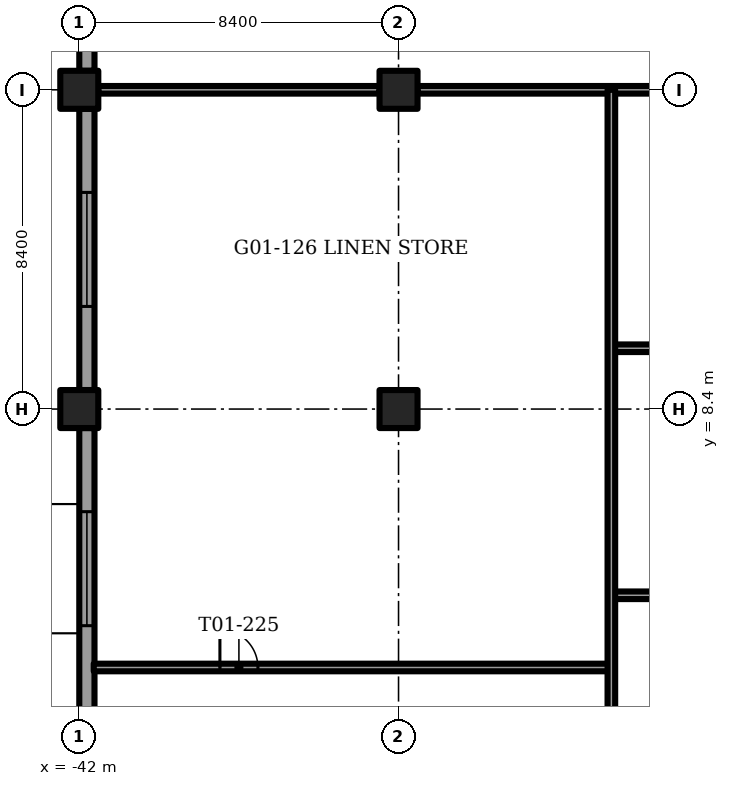
"""IFC4 building model, lengths in metres.
Left out: names, types, materials, properties, quantities, classifications, styles, units other than length and angle.
Written with IfcOpenShell. Run it as: python <this file> out.ifc"""

import sys

from ifc_helpers import new_model, si_unit, direction, frame, frame_2d, origin, origin_2d, place, context, subcontext, project, spatial, rectangle, extrude, element, fill, save


model = new_model("IFC4")
c1 = context("Model", 3, precision=1e-05, world=origin(), true_north=direction((0.0, 1.0)))
c2 = subcontext(c1, "Body", "Model", "MODEL_VIEW")
j1 = project(units=[si_unit("LENGTHUNIT", "METRE"), si_unit("PLANEANGLEUNIT", "RADIAN")], contexts=[c1])
p1 = place(None, origin())
s1 = spatial("IfcSite", under=j1, at=p1, CompositionType="ELEMENT")
p2 = place(p1, origin())
s2 = spatial("IfcBuilding", under=s1, at=p2, CompositionType="ELEMENT")
p3 = place(p2, frame((0.0, 0.0, 6.0)))
s3 = spatial("IfcBuildingStorey", under=s2, at=p3, CompositionType="ELEMENT", Elevation=6.0)
for number, where, z_axis, x_axis in (
    (1, (-42.0, 8.4, -0.35), (0.0, 0.0, 1.0), (1.0, 0.0, 0.0)),
    (2, (-42.0, 16.8, -0.35), (0.0, 0.0, 1.0), (1.0, 0.0, 0.0)),
    (3, (-33.6, 8.4, -0.35), (0.0, 0.0, 1.0), (1.0, 0.0, 0.0)),
    (4, (-33.6, 16.8, -0.35), (0.0, 0.0, 1.0), (1.0, 0.0, 0.0)),
):
    element("IfcColumn", number, at=place(p3, frame(where, z_axis=z_axis, x_axis=x_axis)), inside=s3, PredefinedType="COLUMN", context=c2, shape_type="SweptSolid", body=[
        extrude(rectangle(XDim=1.0, YDim=1.0, at=origin_2d()), origin(), (0.0, 0.0, 1.0), 4.0),
    ])
p4 = place(p3, frame((-41.8, 0.5, 0.0), z_axis=(0.0, 0.0, 1.0), x_axis=(0.0, 1.0, 0.0)))
e5 = element("IfcWall", 5, at=p4, inside=s3, PredefinedType="SOLIDWALL", context=c2, shape_type="SweptSolid", body=[
    extrude(rectangle(XDim=7.4, YDim=0.4, at=frame_2d((3.7, 0.0))), origin(), (0.0, 0.0, 1.0), 3.65),
])
p5 = place(p4, frame((2.2, 0.0, 1.0)))
e6 = element("IfcOpeningElement", 6, at=p5, cuts=e5, PredefinedType="OPENING", context=c2, shape_type="SweptSolid", body=[
    extrude(rectangle(XDim=3.0, YDim=2.2, at=frame_2d((1.5, 1.1))), frame((0.0, 0.2, 0.0), z_axis=(0.0, -1.0, 0.0), x_axis=(1.0, 0.0, 0.0)), (0.0, 0.0, 1.0), 0.4),
])
p6 = place(p3, frame((-41.8, 8.9, 0.0), z_axis=(0.0, 0.0, 1.0), x_axis=(0.0, 1.0, 0.0)))
e7 = element("IfcWall", 7, at=p6, inside=s3, PredefinedType="SOLIDWALL", context=c2, shape_type="SweptSolid", body=[
    extrude(rectangle(XDim=7.4, YDim=0.4, at=frame_2d((3.7, 0.0))), origin(), (0.0, 0.0, 1.0), 3.65),
])
p7 = place(p6, frame((2.2, 0.0, 1.0)))
e8 = element("IfcOpeningElement", 8, at=p7, cuts=e7, PredefinedType="OPENING", context=c2, shape_type="SweptSolid", body=[
    extrude(rectangle(XDim=3.0, YDim=2.2, at=frame_2d((1.5, 1.1))), frame((0.0, 0.2, 0.0), z_axis=(0.0, -1.0, 0.0), x_axis=(1.0, 0.0, 0.0)), (0.0, 0.0, 1.0), 0.4),
])
p8 = place(p3, frame((-41.8, 17.3, 0.0), z_axis=(0.0, 0.0, 1.0), x_axis=(0.0, 1.0, 0.0)))
e9 = element("IfcWall", 9, at=p8, inside=s3, PredefinedType="SOLIDWALL", context=c2, shape_type="SweptSolid", body=[
    extrude(rectangle(XDim=7.4, YDim=0.4, at=frame_2d((3.7, 0.0))), origin(), (0.0, 0.0, 1.0), 3.65),
])
p9 = place(p8, frame((2.2, 0.0, 1.0)))
e10 = element("IfcOpeningElement", 10, at=p9, cuts=e9, PredefinedType="OPENING", context=c2, shape_type="SweptSolid", body=[
    extrude(rectangle(XDim=3.0, YDim=2.2, at=frame_2d((1.5, 1.1))), frame((0.0, 0.2, 0.0), z_axis=(0.0, -1.0, 0.0), x_axis=(1.0, 0.0, 0.0)), (0.0, 0.0, 1.0), 0.4),
])
p10 = place(p3, frame((-41.62, 1.6, 0.0), z_axis=(0.0, 0.0, 1.0), x_axis=(1.0, 0.0, 0.0)))
e11 = element("IfcWall", 11, at=p10, inside=s3, PredefinedType="PARTITIONING", context=c2, shape_type="SweptSolid", body=[
    extrude(rectangle(XDim=13.62, YDim=0.2, at=frame_2d((6.81, 0.0))), origin(), (0.0, 0.0, 1.0), 3.65),
])
p11 = place(p10, frame((3.32, 0.0, 0.0)))
e12 = element("IfcOpeningElement", 12, at=p11, cuts=e11, PredefinedType="OPENING", context=c2, shape_type="SweptSolid", body=[
    extrude(rectangle(XDim=1.0, YDim=2.1, at=frame_2d((0.5, 1.05))), frame((0.0, 0.1, 0.0), z_axis=(0.0, -1.0, 0.0), x_axis=(1.0, 0.0, 0.0)), (0.0, 0.0, 1.0), 0.2),
])
for number, where, z_axis, x_axis in (
    (13, (-28.0, 3.5, 0.0), (0.0, 0.0, 1.0), (1.0, 0.0, 0.0)),
    (14, (-28.0, 10.0, 0.0), (0.0, 0.0, 1.0), (1.0, 0.0, 0.0)),
):
    element("IfcWall", number, at=place(p3, frame(where, z_axis=z_axis, x_axis=x_axis)), inside=s3, PredefinedType="PARTITIONING", context=c2, shape_type="SweptSolid", body=[
        extrude(rectangle(XDim=14.0, YDim=0.2, at=frame_2d((7.0, 0.0))), origin(), (0.0, 0.0, 1.0), 2.8),
    ])
p12 = place(p3, frame((-41.5, 16.8, 0.0), z_axis=(0.0, 0.0, 1.0), x_axis=(1.0, 0.0, 0.0)))
e15 = element("IfcWall", 15, at=p12, inside=s3, PredefinedType="PARTITIONING", context=c2, shape_type="SweptSolid", body=[
    extrude(rectangle(XDim=7.4, YDim=0.2, at=frame_2d((3.7, 0.0))), origin(), (0.0, 0.0, 1.0), 3.65),
])
p13 = place(p3, frame((-33.1, 16.8, 0.0), z_axis=(0.0, 0.0, 1.0), x_axis=(1.0, 0.0, 0.0)))
e16 = element("IfcWall", 16, at=p13, inside=s3, PredefinedType="PARTITIONING", context=c2, shape_type="SweptSolid", body=[
    extrude(rectangle(XDim=7.4, YDim=0.2, at=frame_2d((3.7, 0.0))), origin(), (0.0, 0.0, 1.0), 3.65),
])
p14 = place(p3, frame((-28.0, -21.0, 0.0), z_axis=(0.0, 0.0, 1.0), x_axis=(0.0, 1.0, 0.0)))
e17 = element("IfcWall", 17, at=p14, inside=s3, PredefinedType="PARTITIONING", context=c2, shape_type="SweptSolid", body=[
    extrude(rectangle(XDim=37.8, YDim=0.2, at=frame_2d((18.9, 0.0))), origin(), (0.0, 0.0, 1.0), 3.65),
])
p15 = place(p14, frame((19.45, 0.0, 0.0)))
e18 = element("IfcOpeningElement", 18, at=p15, cuts=e17, PredefinedType="OPENING", context=c2, shape_type="SweptSolid", body=[
    extrude(rectangle(XDim=1.0, YDim=2.1, at=frame_2d((0.5, 1.05))), frame((0.0, 0.1, 0.0), z_axis=(0.0, -1.0, 0.0), x_axis=(1.0, 0.0, 0.0)), (0.0, 0.0, 1.0), 0.2),
])
p16 = place(p5, origin())
e19 = element("IfcWindow", 19, at=p16, inside=s3, PartitioningType="SINGLE_PANEL", PredefinedType="WINDOW", context=c2, shape_type="SweptSolid", body=[
    extrude(rectangle(XDim=3.0, YDim=2.2, at=frame_2d((1.5, 1.1))), frame((0.0, 0.03, 0.0), z_axis=(0.0, -1.0, 0.0), x_axis=(1.0, 0.0, 0.0)), (0.0, 0.0, 1.0), 0.06),
])
fill(e6, e19)
p17 = place(p7, origin())
e20 = element("IfcWindow", 20, at=p17, inside=s3, PartitioningType="SINGLE_PANEL", PredefinedType="WINDOW", context=c2, shape_type="SweptSolid", body=[
    extrude(rectangle(XDim=3.0, YDim=2.2, at=frame_2d((1.5, 1.1))), frame((0.0, 0.03, 0.0), z_axis=(0.0, -1.0, 0.0), x_axis=(1.0, 0.0, 0.0)), (0.0, 0.0, 1.0), 0.06),
])
fill(e8, e20)
p18 = place(p11, origin())
e21 = element("IfcDoor", 21, at=p18, inside=s3, OperationType="SINGLE_SWING_LEFT", PredefinedType="DOOR", context=c2, shape_type="SweptSolid", body=[
    extrude(rectangle(XDim=1.0, YDim=2.1, at=frame_2d((0.5, 1.05))), frame((0.0, 0.025, 0.0), z_axis=(0.0, -1.0, 0.0), x_axis=(1.0, 0.0, 0.0)), (0.0, 0.0, 1.0), 0.05),
])
fill(e12, e21)
save(model, sys.argv[1])
